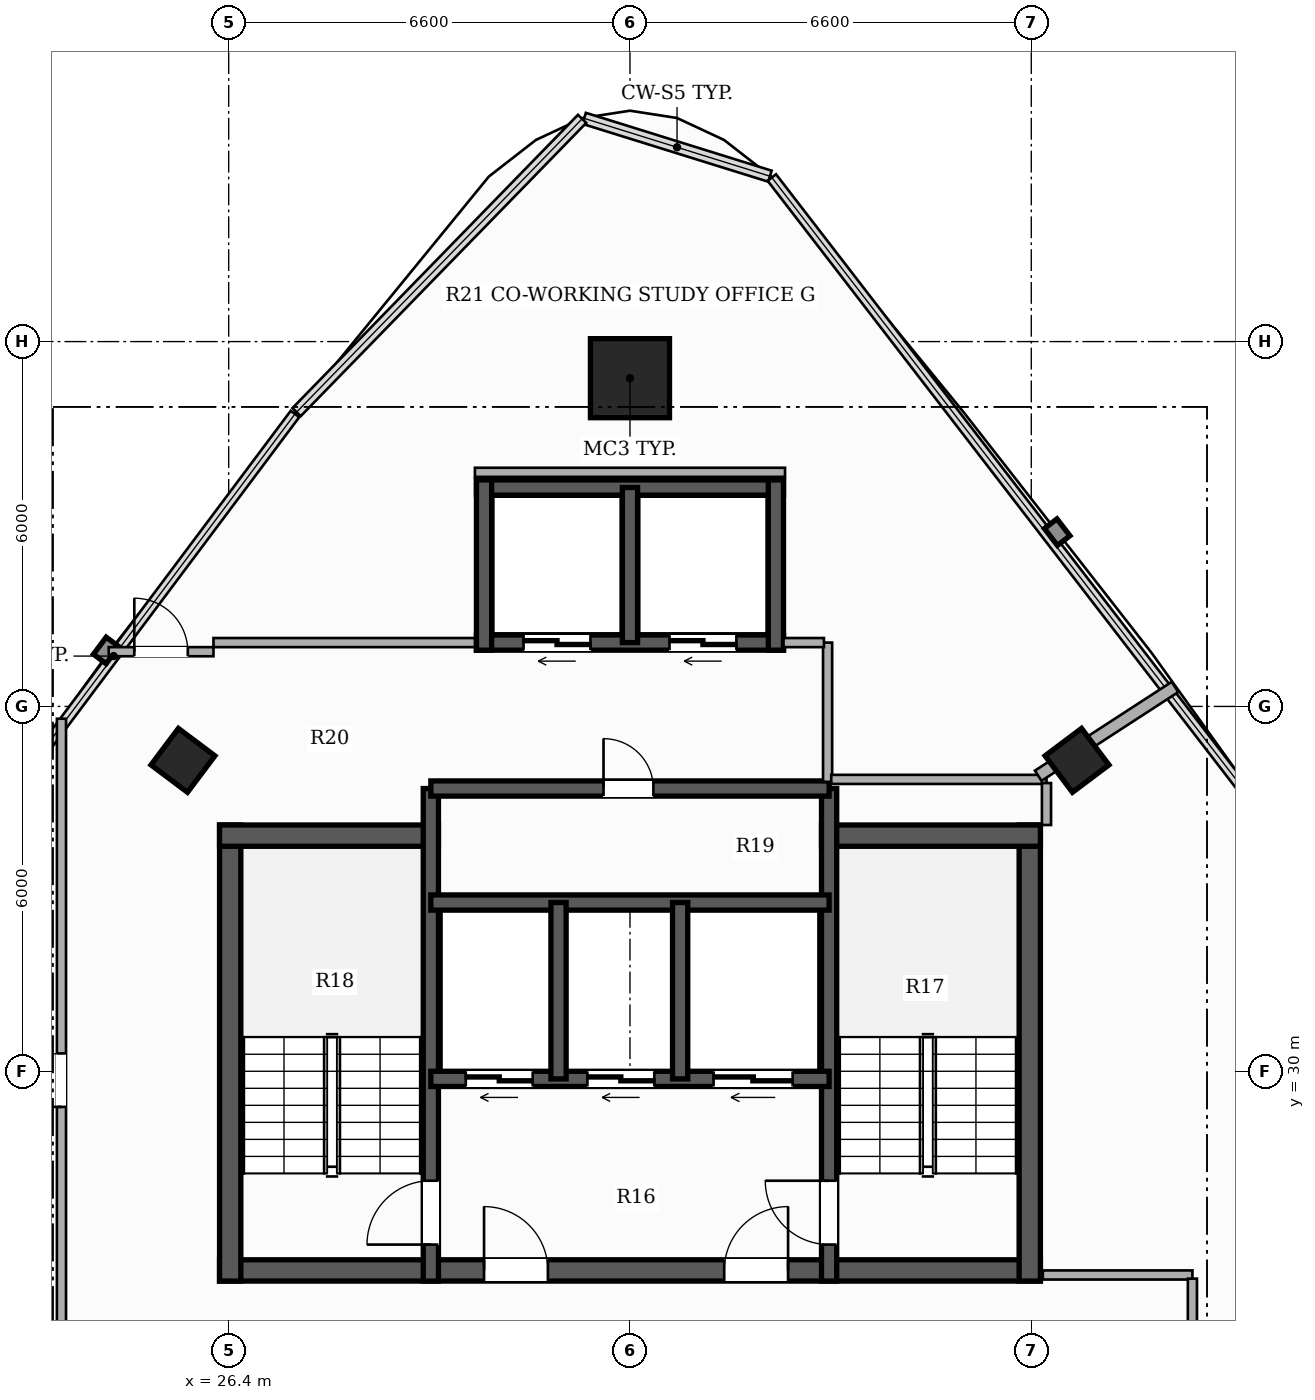
"""IFC4 building model, lengths in metres.
Left out: names, types, materials, properties, quantities, classifications, styles, units other than length and angle.
Written with IfcOpenShell. Run it as: python <this file> out.ifc"""

import sys

from ifc_helpers import new_model, si_unit, direction, frame, frame_2d, origin, origin_2d, place, context, subcontext, project, spatial, rectangle, hollow_rectangle, extrude, element, fill, save


model = new_model("IFC4")
c1 = context("Model", 3, precision=1e-05, world=origin(), true_north=direction((0.0, 1.0)))
c2 = subcontext(c1, "Body", "Model", "MODEL_VIEW")
j1 = project(units=[si_unit("LENGTHUNIT", "METRE"), si_unit("PLANEANGLEUNIT", "RADIAN")], contexts=[c1])
p1 = place(None, origin())
s1 = spatial("IfcSite", under=j1, at=p1, CompositionType="ELEMENT")
p2 = place(p1, origin())
s2 = spatial("IfcBuilding", under=s1, at=p2, CompositionType="ELEMENT")
p3 = place(p2, frame((0.0, 0.0, 226.1)))
s3 = spatial("IfcBuildingStorey", under=s2, at=p3, CompositionType="ELEMENT", Elevation=226.1)
p4 = place(p3, frame((26.25, 26.725, 0.0), z_axis=(0.0, 0.0, 1.0), x_axis=(1.0, 0.0, 0.0)))
e1 = element("IfcWall", 1, at=p4, inside=s3, PredefinedType="SHEAR", context=c2, shape_type="SweptSolid", body=[
    extrude(rectangle(XDim=13.5, YDim=0.35, at=frame_2d((6.75, 0.0))), origin(), (0.0, 0.0, 1.0), 3.3),
])
p5 = place(p4, frame((4.35, 0.0, 0.0)))
e2 = element("IfcOpeningElement", 2, at=p5, cuts=e1, PredefinedType="OPENING", context=c2, shape_type="SweptSolid", body=[
    extrude(rectangle(XDim=1.05, YDim=2.15, at=frame_2d((0.525, 1.075))), frame((0.0, 0.185, 0.0), z_axis=(0.0, -1.0, 0.0), x_axis=(1.0, 0.0, 0.0)), (0.0, 0.0, 1.0), 0.37),
])
p6 = place(p4, frame((8.3, 0.0, 0.0)))
e3 = element("IfcOpeningElement", 3, at=p6, cuts=e1, PredefinedType="OPENING", context=c2, shape_type="SweptSolid", body=[
    extrude(rectangle(XDim=1.05, YDim=2.15, at=frame_2d((0.525, 1.075))), frame((0.0, 0.185, 0.0), z_axis=(0.0, -1.0, 0.0), x_axis=(1.0, 0.0, 0.0)), (0.0, 0.0, 1.0), 0.37),
])
p7 = place(p3, frame((26.425, 26.55, 0.0), z_axis=(0.0, 0.0, 1.0), x_axis=(0.0, 1.0, 0.0)))
e4 = element("IfcWall", 4, at=p7, inside=s3, PredefinedType="SHEAR", context=c2, shape_type="SweptSolid", body=[
    extrude(rectangle(XDim=7.5, YDim=0.35, at=frame_2d((3.75, 0.0))), origin(), (0.0, 0.0, 1.0), 3.3),
])
p8 = place(p3, frame((26.25, 33.875, 0.0), z_axis=(0.0, 0.0, 1.0), x_axis=(1.0, 0.0, 0.0)))
e5 = element("IfcWall", 5, at=p8, inside=s3, PredefinedType="SHEAR", context=c2, shape_type="SweptSolid", body=[
    extrude(rectangle(XDim=3.6, YDim=0.35, at=frame_2d((1.8, 0.0))), origin(), (0.0, 0.0, 1.0), 3.3),
])
p9 = place(p3, frame((39.575, 26.55, 0.0), z_axis=(0.0, 0.0, 1.0), x_axis=(0.0, 1.0, 0.0)))
e6 = element("IfcWall", 6, at=p9, inside=s3, PredefinedType="SHEAR", context=c2, shape_type="SweptSolid", body=[
    extrude(rectangle(XDim=7.5, YDim=0.35, at=frame_2d((3.75, 0.0))), origin(), (0.0, 0.0, 1.0), 3.3),
])
p10 = place(p3, frame((36.15, 33.875, 0.0), z_axis=(0.0, 0.0, 1.0), x_axis=(1.0, 0.0, 0.0)))
e7 = element("IfcWall", 7, at=p10, inside=s3, PredefinedType="SHEAR", context=c2, shape_type="SweptSolid", body=[
    extrude(rectangle(XDim=3.6, YDim=0.35, at=frame_2d((1.8, 0.0))), origin(), (0.0, 0.0, 1.0), 3.3),
])
p11 = place(p3, frame((29.725, 26.55, 0.0), z_axis=(0.0, 0.0, 1.0), x_axis=(0.0, 1.0, 0.0)))
e8 = element("IfcWall", 8, at=p11, inside=s3, PredefinedType="SHEAR", context=c2, shape_type="SweptSolid", body=[
    extrude(rectangle(XDim=8.1, YDim=0.25, at=frame_2d((4.05, 0.0))), origin(), (0.0, 0.0, 1.0), 3.3),
])
p12 = place(p11, frame((0.6, 0.0, 0.0)))
e9 = element("IfcOpeningElement", 9, at=p12, cuts=e8, PredefinedType="OPENING", context=c2, shape_type="SweptSolid", body=[
    extrude(rectangle(XDim=1.05, YDim=2.15, at=frame_2d((0.525, 1.075))), frame((0.0, 0.135, 0.0), z_axis=(0.0, -1.0, 0.0), x_axis=(1.0, 0.0, 0.0)), (0.0, 0.0, 1.0), 0.27),
])
p13 = place(p3, frame((36.275, 26.55, 0.0), z_axis=(0.0, 0.0, 1.0), x_axis=(0.0, 1.0, 0.0)))
e10 = element("IfcWall", 10, at=p13, inside=s3, PredefinedType="SHEAR", context=c2, shape_type="SweptSolid", body=[
    extrude(rectangle(XDim=8.1, YDim=0.25, at=frame_2d((4.05, 0.0))), origin(), (0.0, 0.0, 1.0), 3.3),
])
p14 = place(p13, frame((0.6, 0.0, 0.0)))
e11 = element("IfcOpeningElement", 11, at=p14, cuts=e10, PredefinedType="OPENING", context=c2, shape_type="SweptSolid", body=[
    extrude(rectangle(XDim=1.05, YDim=2.15, at=frame_2d((0.525, 1.075))), frame((0.0, 0.135, 0.0), z_axis=(0.0, -1.0, 0.0), x_axis=(1.0, 0.0, 0.0)), (0.0, 0.0, 1.0), 0.27),
])
p15 = place(p3, frame((36.275, 29.875, 0.0), z_axis=(0.0, 0.0, 1.0), x_axis=(-1.0, 0.0, 0.0)))
e12 = element("IfcWall", 12, at=p15, inside=s3, PredefinedType="SHEAR", context=c2, shape_type="SweptSolid", body=[
    extrude(rectangle(XDim=6.55, YDim=0.25, at=frame_2d((3.275, 0.0))), origin(), (0.0, 0.0, 1.0), 3.3),
])
p16 = place(p15, frame((4.875, 0.0, 0.0)))
e13 = element("IfcOpeningElement", 13, at=p16, cuts=e12, PredefinedType="OPENING", context=c2, shape_type="SweptSolid", body=[
    extrude(rectangle(XDim=1.1, YDim=2.2, at=frame_2d((0.55, 1.1))), frame((0.0, 0.135, 0.0), z_axis=(0.0, -1.0, 0.0), x_axis=(1.0, 0.0, 0.0)), (0.0, 0.0, 1.0), 0.27),
])
p17 = place(p15, frame((2.875, 0.0, 0.0)))
e14 = element("IfcOpeningElement", 14, at=p17, cuts=e12, PredefinedType="OPENING", context=c2, shape_type="SweptSolid", body=[
    extrude(rectangle(XDim=1.1, YDim=2.2, at=frame_2d((0.55, 1.1))), frame((0.0, 0.135, 0.0), z_axis=(0.0, -1.0, 0.0), x_axis=(1.0, 0.0, 0.0)), (0.0, 0.0, 1.0), 0.27),
])
p18 = place(p15, frame((0.6, 0.0, 0.0)))
e15 = element("IfcOpeningElement", 15, at=p18, cuts=e12, PredefinedType="OPENING", context=c2, shape_type="SweptSolid", body=[
    extrude(rectangle(XDim=1.3, YDim=2.2, at=frame_2d((0.65, 1.1))), frame((0.0, 0.135, 0.0), z_axis=(0.0, -1.0, 0.0), x_axis=(1.0, 0.0, 0.0)), (0.0, 0.0, 1.0), 0.27),
])
p19 = place(p3, frame((29.725, 32.775, 0.0), z_axis=(0.0, 0.0, 1.0), x_axis=(1.0, 0.0, 0.0)))
e16 = element("IfcWall", 16, at=p19, inside=s3, PredefinedType="SHEAR", context=c2, shape_type="SweptSolid", body=[
    extrude(rectangle(XDim=6.55, YDim=0.25, at=frame_2d((3.275, 0.0))), origin(), (0.0, 0.0, 1.0), 3.3),
])
for number, where, z_axis, x_axis in (
    (17, (31.825, 29.875, 0.0), (0.0, 0.0, 1.0), (0.0, 1.0, 0.0)),
    (18, (33.825, 29.875, 0.0), (0.0, 0.0, 1.0), (0.0, 1.0, 0.0)),
):
    element("IfcWall", number, at=place(p3, frame(where, z_axis=z_axis, x_axis=x_axis)), inside=s3, PredefinedType="SHEAR", context=c2, shape_type="SweptSolid", body=[
        extrude(rectangle(XDim=2.9, YDim=0.25, at=frame_2d((1.45, 0.0))), origin(), (0.0, 0.0, 1.0), 3.3),
    ])
p20 = place(p3, frame((29.725, 34.65, 0.0), z_axis=(0.0, 0.0, 1.0), x_axis=(1.0, 0.0, 0.0)))
e19 = element("IfcWall", 19, at=p20, inside=s3, PredefinedType="SHEAR", context=c2, shape_type="SweptSolid", body=[
    extrude(rectangle(XDim=6.55, YDim=0.25, at=frame_2d((3.275, 0.0))), origin(), (0.0, 0.0, 1.0), 3.3),
])
p21 = place(p20, frame((2.84, 0.0, 0.0)))
e20 = element("IfcOpeningElement", 20, at=p21, cuts=e19, PredefinedType="OPENING", context=c2, shape_type="SweptSolid", body=[
    extrude(rectangle(XDim=0.82, YDim=2.1, at=frame_2d((0.41, 1.05))), frame((0.0, 0.135, 0.0), z_axis=(0.0, -1.0, 0.0), x_axis=(1.0, 0.0, 0.0)), (0.0, 0.0, 1.0), 0.27),
])
p22 = place(p3, frame((35.525, 37.05, 0.0), z_axis=(0.0, 0.0, 1.0), x_axis=(-1.0, 0.0, 0.0)))
e21 = element("IfcWall", 21, at=p22, inside=s3, PredefinedType="SHEAR", context=c2, shape_type="SweptSolid", body=[
    extrude(rectangle(XDim=5.05, YDim=0.25, at=frame_2d((2.525, 0.0))), origin(), (0.0, 0.0, 1.0), 3.3),
])
p23 = place(p22, frame((3.175, 0.0, 0.0)))
e22 = element("IfcOpeningElement", 22, at=p23, cuts=e21, PredefinedType="OPENING", context=c2, shape_type="SweptSolid", body=[
    extrude(rectangle(XDim=1.1, YDim=2.2, at=frame_2d((0.55, 1.1))), frame((0.0, 0.135, 0.0), z_axis=(0.0, -1.0, 0.0), x_axis=(1.0, 0.0, 0.0)), (0.0, 0.0, 1.0), 0.27),
])
p24 = place(p22, frame((0.775, 0.0, 0.0)))
e23 = element("IfcOpeningElement", 23, at=p24, cuts=e21, PredefinedType="OPENING", context=c2, shape_type="SweptSolid", body=[
    extrude(rectangle(XDim=1.1, YDim=2.2, at=frame_2d((0.55, 1.1))), frame((0.0, 0.135, 0.0), z_axis=(0.0, -1.0, 0.0), x_axis=(1.0, 0.0, 0.0)), (0.0, 0.0, 1.0), 0.27),
])
p25 = place(p3, frame((30.475, 39.6, 0.0), z_axis=(0.0, 0.0, 1.0), x_axis=(1.0, 0.0, 0.0)))
e24 = element("IfcWall", 24, at=p25, inside=s3, PredefinedType="SHEAR", context=c2, shape_type="SweptSolid", body=[
    extrude(rectangle(XDim=5.05, YDim=0.25, at=frame_2d((2.525, 0.0))), origin(), (0.0, 0.0, 1.0), 3.3),
])
for number, where, z_axis, x_axis in (
    (25, (30.6, 36.925, 0.0), (0.0, 0.0, 1.0), (0.0, 1.0, 0.0)),
    (26, (35.4, 36.925, 0.0), (0.0, 0.0, 1.0), (0.0, 1.0, 0.0)),
):
    element("IfcWall", number, at=place(p3, frame(where, z_axis=z_axis, x_axis=x_axis)), inside=s3, PredefinedType="SHEAR", context=c2, shape_type="SweptSolid", body=[
        extrude(rectangle(XDim=2.8, YDim=0.25, at=frame_2d((1.4, 0.0))), origin(), (0.0, 0.0, 1.0), 3.3),
    ])
p26 = place(p3, frame((33.0, 37.05, 0.0), z_axis=(0.0, 0.0, 1.0), x_axis=(0.0, 1.0, 0.0)))
e27 = element("IfcWall", 27, at=p26, inside=s3, PredefinedType="SHEAR", context=c2, shape_type="SweptSolid", body=[
    extrude(rectangle(XDim=2.55, YDim=0.25, at=frame_2d((1.275, 0.0))), origin(), (0.0, 0.0, 1.0), 3.3),
])
p27 = place(p3, frame((33.0, 41.398, 0.0), z_axis=(0.0, 0.0, 1.0), x_axis=(1.0, 0.0, 0.0)))
e28 = element("IfcColumn", 28, at=p27, inside=s3, PredefinedType="COLUMN", context=c2, shape_type="SweptSolid", body=[
    extrude(hollow_rectangle(XDim=1.3, YDim=1.3, WallThickness=0.04, at=origin_2d()), origin(), (0.0, 0.0, 1.0), 3.3),
])
for number, where, z_axis, x_axis in (
    (29, (25.648, 35.113, 0.0), (0.0, 0.0, 1.0), (0.6, 0.8, 0.0)),
    (30, (40.352, 35.113, 0.0), (0.0, 0.0, 1.0), (-0.6, 0.8, 0.0)),
):
    element("IfcColumn", number, at=place(p3, frame(where, z_axis=z_axis, x_axis=x_axis)), inside=s3, PredefinedType="COLUMN", context=c2, shape_type="SweptSolid", body=[
        extrude(hollow_rectangle(XDim=0.75, YDim=0.75, WallThickness=0.025, at=origin_2d()), origin(), (0.0, 0.0, 1.0), 3.3),
    ])
p28 = place(p3, frame((36.25, 34.76, 0.0), z_axis=(0.0, 0.0, 1.0), x_axis=(0.0, 1.0, 0.0)))
e31 = element("IfcWall", 31, at=p28, inside=s3, PredefinedType="PARTITIONING", context=c2, shape_type="SweptSolid", body=[
    extrude(rectangle(XDim=2.29, YDim=0.15, at=frame_2d((1.145, 0.0))), origin(), (0.0, 0.0, 1.0), 2.425),
])
p29 = place(p3, frame((35.525, 37.05, 0.0), z_axis=(0.0, 0.0, 1.0), x_axis=(1.0, 0.0, 0.0)))
e32 = element("IfcWall", 32, at=p29, inside=s3, PredefinedType="PARTITIONING", context=c2, shape_type="SweptSolid", body=[
    extrude(rectangle(XDim=0.665, YDim=0.15, at=frame_2d((0.333, 0.0))), origin(), (0.0, 0.0, 1.0), 2.425),
])
p30 = place(p3, frame((23.65, 23.91, 0.0), z_axis=(0.0, 0.0, 1.0), x_axis=(0.0, 1.0, 0.0)))
e33 = element("IfcWall", 33, at=p30, inside=s3, PredefinedType="PARTITIONING", context=c2, shape_type="SweptSolid", body=[
    extrude(rectangle(XDim=11.888, YDim=0.15, at=frame_2d((5.944, 0.0))), origin(), (0.0, 0.0, 1.0), 2.492),
])
p31 = place(p30, frame((5.504, 0.0, 0.0)))
e34 = element("IfcOpeningElement", 34, at=p31, cuts=e33, PredefinedType="OPENING", context=c2, shape_type="SweptSolid", body=[
    extrude(rectangle(XDim=0.88, YDim=2.1, at=frame_2d((0.44, 1.05))), frame((0.0, 0.085, 0.0), z_axis=(0.0, -1.0, 0.0), x_axis=(1.0, 0.0, 0.0)), (0.0, 0.0, 1.0), 0.17),
])
p32 = place(p3, frame((24.427, 36.9, 0.0), z_axis=(0.0, 0.0, 1.0), x_axis=(1.0, 0.0, 0.0)))
e35 = element("IfcWall", 35, at=p32, inside=s3, PredefinedType="PARTITIONING", context=c2, shape_type="SweptSolid", body=[
    extrude(rectangle(XDim=1.723, YDim=0.15, at=frame_2d((0.861, 0.0))), origin(), (0.0, 0.0, 1.0), 2.619),
])
p33 = place(p32, frame((0.421, 0.0, 0.0)))
e36 = element("IfcOpeningElement", 36, at=p33, cuts=e35, PredefinedType="OPENING", context=c2, shape_type="SweptSolid", body=[
    extrude(rectangle(XDim=0.88, YDim=2.1, at=frame_2d((0.44, 1.05))), frame((0.0, 0.085, 0.0), z_axis=(0.0, -1.0, 0.0), x_axis=(1.0, 0.0, 0.0)), (0.0, 0.0, 1.0), 0.17),
])
p34 = place(p3, frame((39.79, 26.65, 0.0), z_axis=(0.0, 0.0, 1.0), x_axis=(1.0, 0.0, 0.0)))
e37 = element("IfcWall", 37, at=p34, inside=s3, PredefinedType="PARTITIONING", context=c2, shape_type="SweptSolid", body=[
    extrude(rectangle(XDim=2.46, YDim=0.15, at=frame_2d((1.23, 0.0))), origin(), (0.0, 0.0, 1.0), 2.565),
])
p35 = place(p3, frame((42.25, 26.59, 0.0), z_axis=(0.0, 0.0, 1.0), x_axis=(0.0, -1.0, 0.0)))
e38 = element("IfcWall", 38, at=p35, inside=s3, PredefinedType="PARTITIONING", context=c2, shape_type="SweptSolid", body=[
    extrude(rectangle(XDim=2.74, YDim=0.15, at=frame_2d((1.37, 0.0))), origin(), (0.0, 0.0, 1.0), 2.773),
])
p36 = place(p35, frame((0.91, 0.0, 0.0)))
e39 = element("IfcOpeningElement", 39, at=p36, cuts=e38, PredefinedType="OPENING", context=c2, shape_type="SweptSolid", body=[
    extrude(rectangle(XDim=0.92, YDim=2.15, at=frame_2d((0.46, 1.075))), frame((0.0, 0.085, 0.0), z_axis=(0.0, -1.0, 0.0), x_axis=(1.0, 0.0, 0.0)), (0.0, 0.0, 1.0), 0.17),
])
p37 = place(p3, frame((26.15, 37.05, 0.0), z_axis=(0.0, 0.0, 1.0), x_axis=(1.0, 0.0, 0.0)))
e40 = element("IfcWall", 40, at=p37, inside=s3, PredefinedType="PARTITIONING", context=c2, shape_type="SweptSolid", body=[
    extrude(rectangle(XDim=4.3, YDim=0.15, at=frame_2d((2.15, 0.0))), origin(), (0.0, 0.0, 1.0), 2.425),
])
p38 = place(p3, frame((30.45, 39.85, 0.0), z_axis=(0.0, 0.0, 1.0), x_axis=(1.0, 0.0, 0.0)))
e41 = element("IfcWall", 41, at=p38, inside=s3, PredefinedType="PARTITIONING", context=c2, shape_type="SweptSolid", body=[
    extrude(rectangle(XDim=5.1, YDim=0.15, at=frame_2d((2.55, 0.0))), origin(), (0.0, 0.0, 1.0), 2.492),
])
p39 = place(p3, frame((36.31, 34.8, 0.0), z_axis=(0.0, 0.0, 1.0), x_axis=(1.0, 0.0, 0.0)))
e42 = element("IfcWall", 42, at=p39, inside=s3, PredefinedType="PARTITIONING", context=c2, shape_type="SweptSolid", body=[
    extrude(rectangle(XDim=3.54, YDim=0.15, at=frame_2d((1.77, 0.0))), origin(), (0.0, 0.0, 1.0), 2.425),
])
p40 = place(p3, frame((39.85, 34.74, 0.0), z_axis=(0.0, 0.0, 1.0), x_axis=(0.0, -1.0, 0.0)))
e43 = element("IfcWall", 43, at=p40, inside=s3, PredefinedType="PARTITIONING", context=c2, shape_type="SweptSolid", body=[
    extrude(rectangle(XDim=0.69, YDim=0.15, at=frame_2d((0.345, 0.0))), origin(), (0.0, 0.0, 1.0), 2.773),
])
p41 = place(p3, frame((39.714, 34.86, 0.0), z_axis=(0.0, 0.0, 1.0), x_axis=(0.838740992226, 0.54453057578, 0.0)))
e44 = element("IfcWall", 44, at=p41, inside=s3, PredefinedType="PARTITIONING", context=c2, shape_type="SweptSolid", body=[
    extrude(rectangle(XDim=2.681, YDim=0.2, at=frame_2d((1.341, 0.0))), origin(), (0.0, 0.0, 1.0), 2.492),
])
p42 = place(p12, origin())
e45 = element("IfcDoor", 45, at=p42, inside=s3, OperationType="SINGLE_SWING_LEFT", PredefinedType="DOOR", context=c2, shape_type="SweptSolid", body=[
    extrude(rectangle(XDim=1.05, YDim=2.15, at=frame_2d((0.525, 1.075))), frame((0.0, 0.025, 0.0), z_axis=(0.0, -1.0, 0.0), x_axis=(1.0, 0.0, 0.0)), (0.0, 0.0, 1.0), 0.05),
])
fill(e9, e45)
p43 = place(p14, origin())
e46 = element("IfcDoor", 46, at=p43, inside=s3, OperationType="SINGLE_SWING_RIGHT", PredefinedType="DOOR", context=c2, shape_type="SweptSolid", body=[
    extrude(rectangle(XDim=1.05, YDim=2.15, at=frame_2d((0.525, 1.075))), frame((0.0, 0.025, 0.0), z_axis=(0.0, -1.0, 0.0), x_axis=(1.0, 0.0, 0.0)), (0.0, 0.0, 1.0), 0.05),
])
fill(e11, e46)
p44 = place(p5, origin())
e47 = element("IfcDoor", 47, at=p44, inside=s3, OperationType="SINGLE_SWING_LEFT", PredefinedType="DOOR", context=c2, shape_type="SweptSolid", body=[
    extrude(rectangle(XDim=1.05, YDim=2.15, at=frame_2d((0.525, 1.075))), frame((0.0, 0.025, 0.0), z_axis=(0.0, -1.0, 0.0), x_axis=(1.0, 0.0, 0.0)), (0.0, 0.0, 1.0), 0.05),
])
fill(e2, e47)
p45 = place(p6, origin())
e48 = element("IfcDoor", 48, at=p45, inside=s3, OperationType="SINGLE_SWING_RIGHT", PredefinedType="DOOR", context=c2, shape_type="SweptSolid", body=[
    extrude(rectangle(XDim=1.05, YDim=2.15, at=frame_2d((0.525, 1.075))), frame((0.0, 0.025, 0.0), z_axis=(0.0, -1.0, 0.0), x_axis=(1.0, 0.0, 0.0)), (0.0, 0.0, 1.0), 0.05),
])
fill(e3, e48)
p46 = place(p16, origin())
e49 = element("IfcDoor", 49, at=p46, inside=s3, OperationType="DOUBLE_DOOR_SLIDING", PredefinedType="DOOR", context=c2, shape_type="SweptSolid", body=[
    extrude(rectangle(XDim=1.1, YDim=2.2, at=frame_2d((0.55, 1.1))), frame((0.0, 0.025, 0.0), z_axis=(0.0, -1.0, 0.0), x_axis=(1.0, 0.0, 0.0)), (0.0, 0.0, 1.0), 0.05),
])
fill(e13, e49)
p47 = place(p17, origin())
e50 = element("IfcDoor", 50, at=p47, inside=s3, OperationType="DOUBLE_DOOR_SLIDING", PredefinedType="DOOR", context=c2, shape_type="SweptSolid", body=[
    extrude(rectangle(XDim=1.1, YDim=2.2, at=frame_2d((0.55, 1.1))), frame((0.0, 0.025, 0.0), z_axis=(0.0, -1.0, 0.0), x_axis=(1.0, 0.0, 0.0)), (0.0, 0.0, 1.0), 0.05),
])
fill(e14, e50)
p48 = place(p18, origin())
e51 = element("IfcDoor", 51, at=p48, inside=s3, OperationType="DOUBLE_DOOR_SLIDING", PredefinedType="DOOR", context=c2, shape_type="SweptSolid", body=[
    extrude(rectangle(XDim=1.3, YDim=2.2, at=frame_2d((0.65, 1.1))), frame((0.0, 0.025, 0.0), z_axis=(0.0, -1.0, 0.0), x_axis=(1.0, 0.0, 0.0)), (0.0, 0.0, 1.0), 0.05),
])
fill(e15, e51)
p49 = place(p23, origin())
e52 = element("IfcDoor", 52, at=p49, inside=s3, OperationType="DOUBLE_DOOR_SLIDING", PredefinedType="DOOR", context=c2, shape_type="SweptSolid", body=[
    extrude(rectangle(XDim=1.1, YDim=2.2, at=frame_2d((0.55, 1.1))), frame((0.0, 0.025, 0.0), z_axis=(0.0, -1.0, 0.0), x_axis=(1.0, 0.0, 0.0)), (0.0, 0.0, 1.0), 0.05),
])
fill(e22, e52)
p50 = place(p24, origin())
e53 = element("IfcDoor", 53, at=p50, inside=s3, OperationType="DOUBLE_DOOR_SLIDING", PredefinedType="DOOR", context=c2, shape_type="SweptSolid", body=[
    extrude(rectangle(XDim=1.1, YDim=2.2, at=frame_2d((0.55, 1.1))), frame((0.0, 0.025, 0.0), z_axis=(0.0, -1.0, 0.0), x_axis=(1.0, 0.0, 0.0)), (0.0, 0.0, 1.0), 0.05),
])
fill(e23, e53)
p51 = place(p21, origin())
e54 = element("IfcDoor", 54, at=p51, inside=s3, OperationType="SINGLE_SWING_LEFT", PredefinedType="DOOR", context=c2, shape_type="SweptSolid", body=[
    extrude(rectangle(XDim=0.82, YDim=2.1, at=frame_2d((0.41, 1.05))), frame((0.0, 0.025, 0.0), z_axis=(0.0, -1.0, 0.0), x_axis=(1.0, 0.0, 0.0)), (0.0, 0.0, 1.0), 0.05),
])
fill(e20, e54)
p52 = place(p31, origin())
e55 = element("IfcDoor", 55, at=p52, inside=s3, OperationType="SINGLE_SWING_LEFT", PredefinedType="DOOR", context=c2, shape_type="SweptSolid", body=[
    extrude(rectangle(XDim=0.88, YDim=2.1, at=frame_2d((0.44, 1.05))), frame((0.0, 0.025, 0.0), z_axis=(0.0, -1.0, 0.0), x_axis=(1.0, 0.0, 0.0)), (0.0, 0.0, 1.0), 0.05),
])
fill(e34, e55)
p53 = place(p33, origin())
e56 = element("IfcDoor", 56, at=p53, inside=s3, OperationType="SINGLE_SWING_LEFT", PredefinedType="DOOR", context=c2, shape_type="SweptSolid", body=[
    extrude(rectangle(XDim=0.88, YDim=2.1, at=frame_2d((0.44, 1.05))), frame((0.0, 0.025, 0.0), z_axis=(0.0, -1.0, 0.0), x_axis=(1.0, 0.0, 0.0)), (0.0, 0.0, 1.0), 0.05),
])
fill(e36, e56)
save(model, sys.argv[1])
